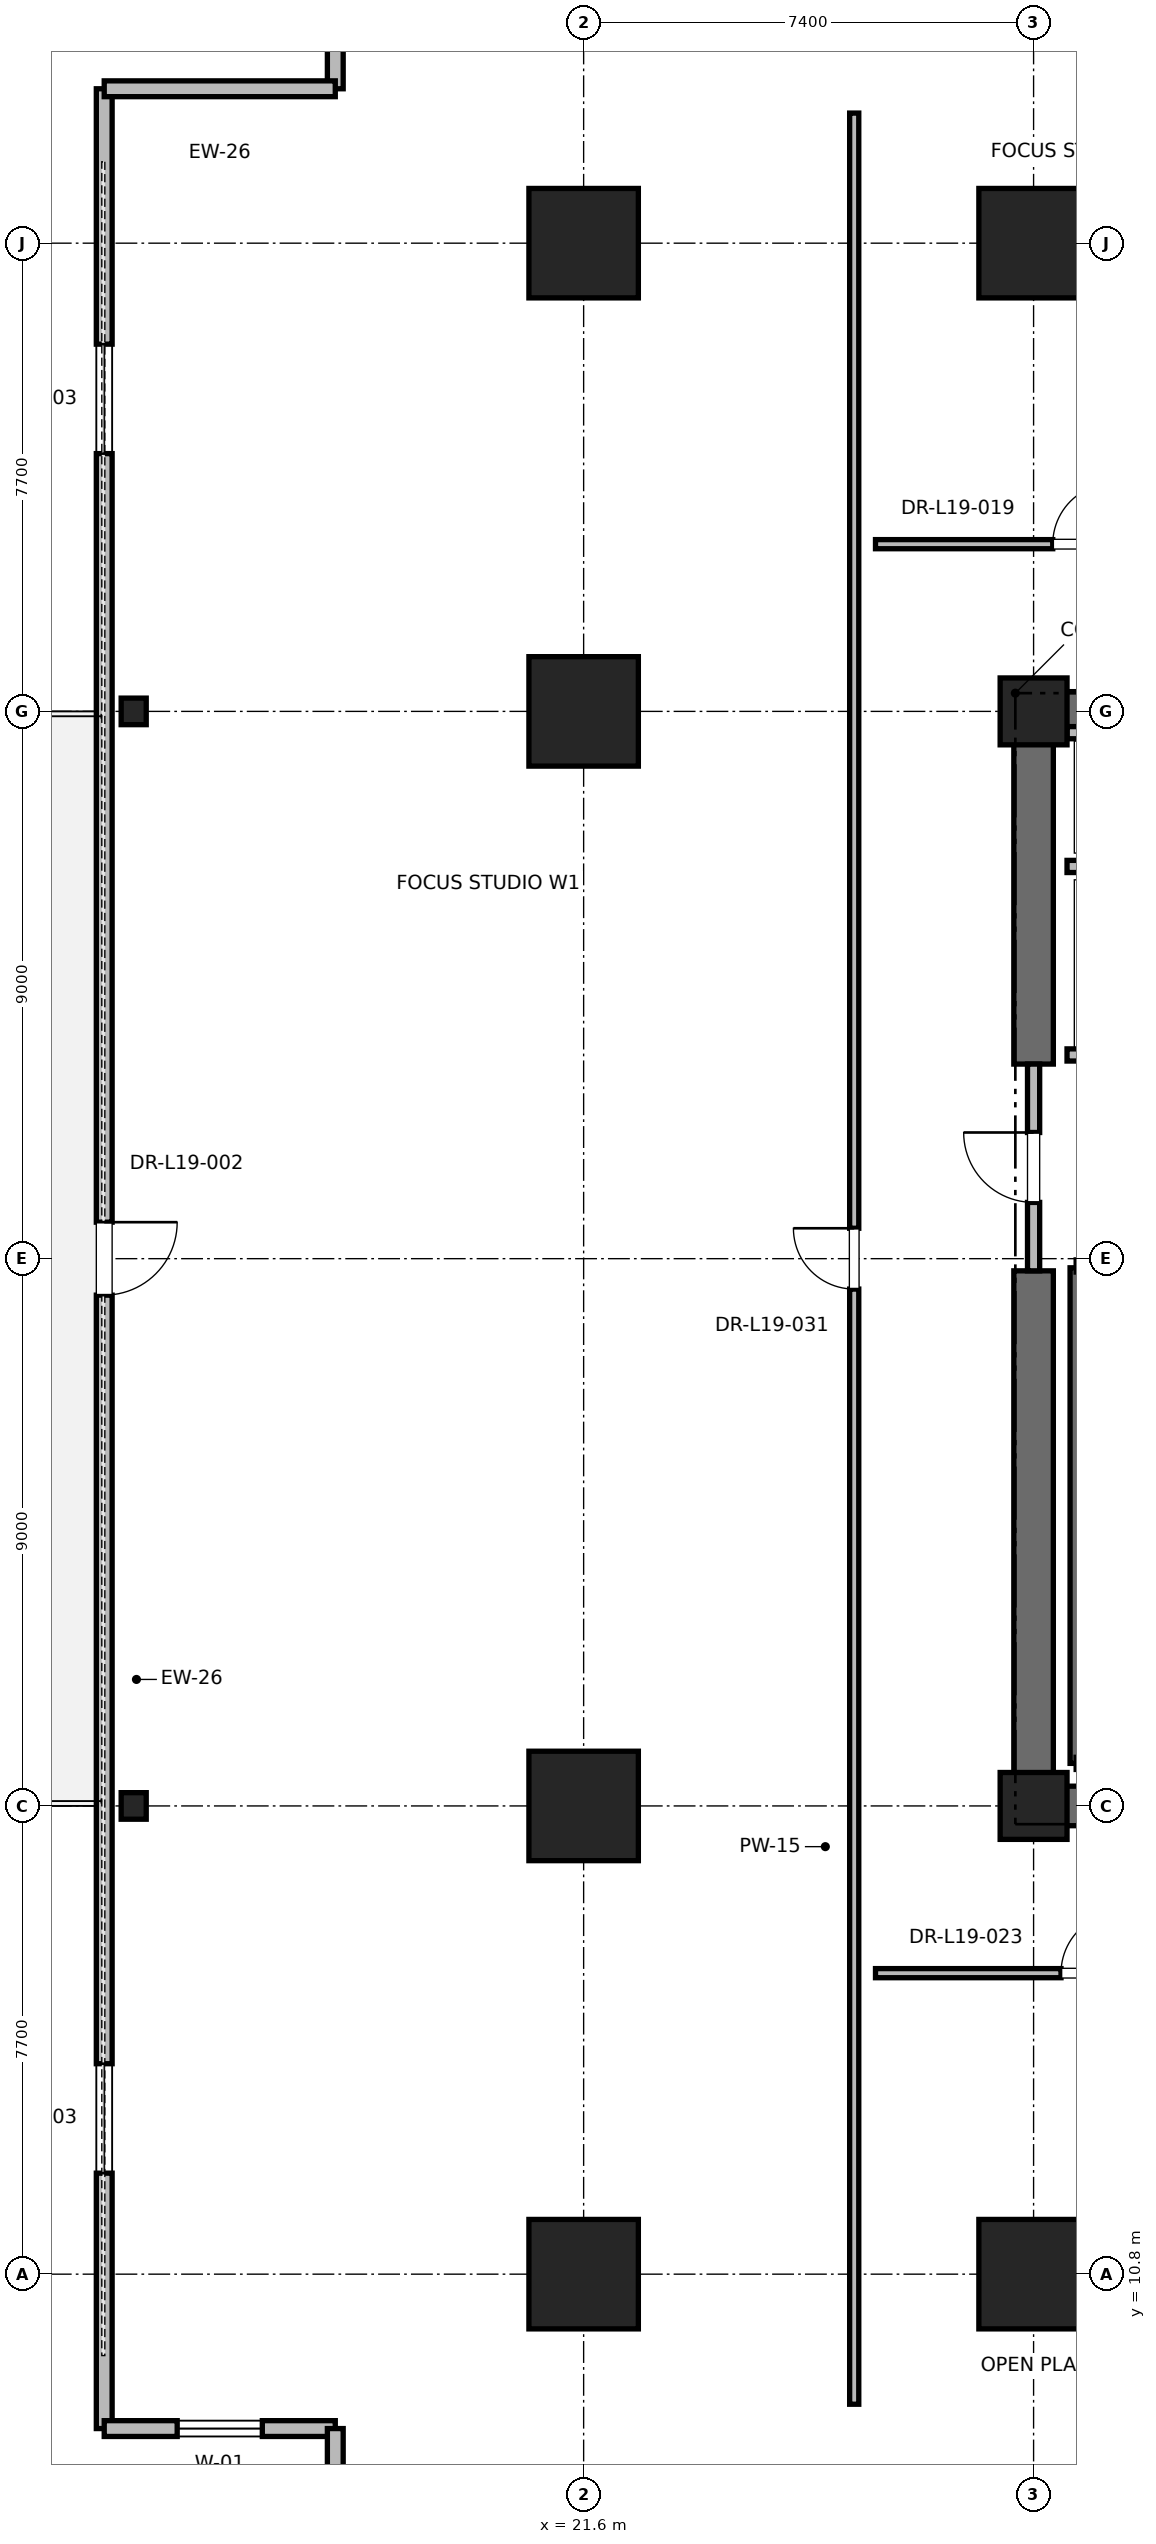
"""IFC4 building model, lengths in metres.
Left out: names, types, materials, properties, quantities, classifications, styles, units other than length and angle.
Written with IfcOpenShell. Run it as: python <this file> out.ifc"""

import sys

from ifc_helpers import new_model, si_unit, direction, frame, frame_2d, origin, origin_2d, place, context, subcontext, project, spatial, rectangle, i_section, extrude, element, fill, save


model = new_model("IFC4")
c1 = context("Model", 3, precision=1e-05, world=origin(), true_north=direction((0.0, 1.0)))
c2 = subcontext(c1, "Body", "Model", "MODEL_VIEW")
j1 = project(units=[si_unit("LENGTHUNIT", "METRE"), si_unit("PLANEANGLEUNIT", "RADIAN")], contexts=[c1])
p1 = place(None, origin())
s1 = spatial("IfcSite", under=j1, at=p1, CompositionType="ELEMENT")
p2 = place(p1, origin())
s2 = spatial("IfcBuilding", under=s1, at=p2, CompositionType="ELEMENT")
p3 = place(p2, frame((0.0, 0.0, 83.6)))
s3 = spatial("IfcBuildingStorey", under=s2, at=p3, CompositionType="ELEMENT", Elevation=83.6)
for number, where, z_axis, x_axis in (
    (1, (29.0, 10.8, 0.0), (0.0, 0.0, 1.0), (1.0, 0.0, 0.0)),
    (2, (29.0, 44.2, 0.0), (0.0, 0.0, 1.0), (1.0, 0.0, 0.0)),
    (3, (21.6, 18.5, 0.0), (0.0, 0.0, 1.0), (1.0, 0.0, 0.0)),
    (4, (21.6, 36.5, 0.0), (0.0, 0.0, 1.0), (1.0, 0.0, 0.0)),
    (5, (21.6, 10.8, 0.0), (0.0, 0.0, 1.0), (1.0, 0.0, 0.0)),
    (6, (21.6, 44.2, 0.0), (0.0, 0.0, 1.0), (1.0, 0.0, 0.0)),
):
    element("IfcColumn", number, at=place(p3, frame(where, z_axis=z_axis, x_axis=x_axis)), inside=s3, PredefinedType="COLUMN", context=c2, shape_type="SweptSolid", body=[
        extrude(rectangle(XDim=1.8, YDim=1.8, at=origin_2d()), origin(), (0.0, 0.0, 1.0), 4.0),
    ])
for number, where, z_axis, x_axis in (
    (7, (14.2, 18.5, 0.0), (0.0, 0.0, 1.0), (1.0, 0.0, 0.0)),
    (8, (14.2, 36.5, 0.0), (0.0, 0.0, 1.0), (1.0, 0.0, 0.0)),
):
    element("IfcColumn", number, at=place(p3, frame(where, z_axis=z_axis, x_axis=x_axis)), inside=s3, PredefinedType="COLUMN", context=c2, shape_type="SweptSolid", body=[
        extrude(i_section(OverallWidth=0.412, OverallDepth=0.437, WebThickness=0.036, FlangeThickness=0.058, FilletRadius=0.015, at=origin_2d()), origin(), (0.0, 0.0, 1.0), 4.0),
    ])
for number, where, z_axis, x_axis in (
    (9, (29.0, 18.5, 0.0), (0.0, 0.0, 1.0), (1.0, 0.0, 0.0)),
    (10, (29.0, 36.5, 0.0), (0.0, 0.0, 1.0), (1.0, 0.0, 0.0)),
):
    element("IfcColumn", number, at=place(p3, frame(where, z_axis=z_axis, x_axis=x_axis)), inside=s3, PredefinedType="PILASTER", context=c2, shape_type="SweptSolid", body=[
        extrude(rectangle(XDim=1.1, YDim=1.1, at=origin_2d()), origin(), (0.0, 0.0, 1.0), 4.0),
    ])
p4 = place(p3, frame((29.0, 18.5, 0.0), z_axis=(0.0, 0.0, 1.0), x_axis=(1.0, 0.0, 0.0)))
e11 = element("IfcWall", 11, at=p4, inside=s3, PredefinedType="SHEAR", context=c2, shape_type="SweptSolid", body=[
    extrude(rectangle(XDim=9.2, YDim=0.65, at=frame_2d((4.6, 0.0))), origin(), (0.0, 0.0, 1.0), 3.76),
])
p5 = place(p3, frame((29.0, 36.5, 0.0), z_axis=(0.0, 0.0, 1.0), x_axis=(1.0, 0.0, 0.0)))
e12 = element("IfcWall", 12, at=p5, inside=s3, PredefinedType="SHEAR", context=c2, shape_type="SweptSolid", body=[
    extrude(rectangle(XDim=5.8, YDim=0.65, at=frame_2d((2.9, 0.0))), origin(), (0.0, 0.0, 1.0), 3.76),
])
p6 = place(p3, frame((29.0, 18.5, 0.0), z_axis=(0.0, 0.0, 1.0), x_axis=(0.0, 1.0, 0.0)))
e13 = element("IfcWall", 13, at=p6, inside=s3, PredefinedType="SHEAR", context=c2, shape_type="SweptSolid", body=[
    extrude(rectangle(XDim=8.8, YDim=0.65, at=frame_2d((4.4, 0.0))), origin(), (0.0, 0.0, 1.0), 3.76),
])
p7 = place(p3, frame((29.0, 30.7, 0.0), z_axis=(0.0, 0.0, 1.0), x_axis=(0.0, 1.0, 0.0)))
e14 = element("IfcWall", 14, at=p7, inside=s3, PredefinedType="SHEAR", context=c2, shape_type="SweptSolid", body=[
    extrude(rectangle(XDim=5.8, YDim=0.65, at=frame_2d((2.9, 0.0))), origin(), (0.0, 0.0, 1.0), 3.76),
])
p8 = place(p3, frame((13.715, 46.739, 0.0), z_axis=(0.0, 0.0, 1.0), x_axis=(0.0, -1.0, 0.0)))
e15 = element("IfcWall", 15, at=p8, inside=s3, PredefinedType="PARAPET", context=c2, shape_type="SweptSolid", body=[
    extrude(rectangle(XDim=38.479, YDim=0.26, at=frame_2d((19.239, 0.0))), origin(), (0.0, 0.0, 1.0), 2.889),
])
p9 = place(p8, frame((4.2, 0.0, 0.85)))
e16 = element("IfcOpeningElement", 16, at=p9, cuts=e15, PredefinedType="OPENING", context=c2, shape_type="SweptSolid", body=[
    extrude(rectangle(XDim=1.8, YDim=2.2, at=frame_2d((0.9, 1.1))), frame((0.0, 0.13, 0.0), z_axis=(0.0, -1.0, 0.0), x_axis=(1.0, 0.0, 0.0)), (0.0, 0.0, 1.0), 0.26),
])
p10 = place(p8, frame((18.639, 0.0, 0.0)))
e17 = element("IfcOpeningElement", 17, at=p10, cuts=e15, PredefinedType="OPENING", context=c2, shape_type="SweptSolid", body=[
    extrude(rectangle(XDim=1.2, YDim=2.2, at=frame_2d((0.6, 1.1))), frame((0.0, 0.13, 0.0), z_axis=(0.0, -1.0, 0.0), x_axis=(1.0, 0.0, 0.0)), (0.0, 0.0, 1.0), 0.26),
])
p11 = place(p8, frame((32.479, 0.0, 0.85)))
e18 = element("IfcOpeningElement", 18, at=p11, cuts=e15, PredefinedType="OPENING", context=c2, shape_type="SweptSolid", body=[
    extrude(rectangle(XDim=1.8, YDim=2.2, at=frame_2d((0.9, 1.1))), frame((0.0, 0.13, 0.0), z_axis=(0.0, -1.0, 0.0), x_axis=(1.0, 0.0, 0.0)), (0.0, 0.0, 1.0), 0.26),
])
p12 = place(p3, frame((13.715, 8.261, 0.0), z_axis=(0.0, 0.0, 1.0), x_axis=(1.0, 0.0, 0.0)))
e19 = element("IfcWall", 19, at=p12, inside=s3, PredefinedType="PARAPET", context=c2, shape_type="SweptSolid", body=[
    extrude(rectangle(XDim=3.8, YDim=0.26, at=frame_2d((1.9, 0.0))), origin(), (0.0, 0.0, 1.0), 3.76),
])
p13 = place(p12, frame((1.2, 0.0, 0.85)))
e20 = element("IfcOpeningElement", 20, at=p13, cuts=e19, PredefinedType="OPENING", context=c2, shape_type="SweptSolid", body=[
    extrude(rectangle(XDim=1.4, YDim=2.0, at=frame_2d((0.7, 1.0))), frame((0.0, 0.13, 0.0), z_axis=(0.0, -1.0, 0.0), x_axis=(1.0, 0.0, 0.0)), (0.0, 0.0, 1.0), 0.26),
])
p14 = place(p3, frame((17.515, 8.261, 0.0), z_axis=(0.0, 0.0, 1.0), x_axis=(0.0, -1.0, 0.0)))
e21 = element("IfcWall", 21, at=p14, inside=s3, PredefinedType="PARAPET", context=c2, shape_type="SweptSolid", body=[
    extrude(rectangle(XDim=3.4, YDim=0.26, at=frame_2d((1.7, 0.0))), origin(), (0.0, 0.0, 1.0), 3.76),
])
p15 = place(p3, frame((17.515, 50.139, 0.0), z_axis=(0.0, 0.0, 1.0), x_axis=(0.0, -1.0, 0.0)))
e22 = element("IfcWall", 22, at=p15, inside=s3, PredefinedType="PARAPET", context=c2, shape_type="SweptSolid", body=[
    extrude(rectangle(XDim=3.4, YDim=0.26, at=frame_2d((1.7, 0.0))), origin(), (0.0, 0.0, 1.0), 3.76),
])
p16 = place(p15, frame((1.0, 0.0, 0.85)))
e23 = element("IfcOpeningElement", 23, at=p16, cuts=e22, PredefinedType="OPENING", context=c2, shape_type="SweptSolid", body=[
    extrude(rectangle(XDim=1.4, YDim=2.0, at=frame_2d((0.7, 1.0))), frame((0.0, 0.13, 0.0), z_axis=(0.0, -1.0, 0.0), x_axis=(1.0, 0.0, 0.0)), (0.0, 0.0, 1.0), 0.26),
])
p17 = place(p3, frame((17.515, 46.739, 0.0), z_axis=(0.0, 0.0, 1.0), x_axis=(-1.0, 0.0, 0.0)))
e24 = element("IfcWall", 24, at=p17, inside=s3, PredefinedType="PARAPET", context=c2, shape_type="SweptSolid", body=[
    extrude(rectangle(XDim=3.8, YDim=0.26, at=frame_2d((1.9, 0.0))), origin(), (0.0, 0.0, 1.0), 3.76),
])
p18 = place(p3, frame((29.7, 19.2, 0.0), z_axis=(0.0, 0.0, 1.0), x_axis=(0.0, 1.0, 0.0)))
e25 = element("IfcWall", 25, at=p18, inside=s3, PredefinedType="SOLIDWALL", context=c2, shape_type="SweptSolid", body=[
    extrude(rectangle(XDim=8.15, YDim=0.2, at=frame_2d((4.075, 0.0))), origin(), (0.0, 0.0, 1.0), 3.76),
])
p19 = place(p3, frame((29.0, 27.3, 0.0), z_axis=(0.0, 0.0, 1.0), x_axis=(0.0, 1.0, 0.0)))
e26 = element("IfcWall", 26, at=p19, inside=s3, PredefinedType="PARTITIONING", context=c2, shape_type="SweptSolid", body=[
    extrude(rectangle(XDim=3.4, YDim=0.2, at=frame_2d((1.7, 0.0))), origin(), (0.0, 0.0, 1.0), 2.54),
])
p20 = place(p19, frame((1.125, 0.0, 0.0)))
e27 = element("IfcOpeningElement", 27, at=p20, cuts=e26, PredefinedType="OPENING", context=c2, shape_type="SweptSolid", body=[
    extrude(rectangle(XDim=1.15, YDim=2.2, at=frame_2d((0.575, 1.1))), frame((0.0, 0.1, 0.0), z_axis=(0.0, -1.0, 0.0), x_axis=(1.0, 0.0, 0.0)), (0.0, 0.0, 1.0), 0.2),
])
p21 = place(p3, frame((29.55, 30.85, 0.0), z_axis=(0.0, 0.0, 1.0), x_axis=(1.0, 0.0, 0.0)))
e28 = element("IfcWall", 28, at=p21, inside=s3, PredefinedType="SOLIDWALL", context=c2, shape_type="SweptSolid", body=[
    extrude(rectangle(XDim=2.6, YDim=0.2, at=frame_2d((1.3, 0.0))), origin(), (0.0, 0.0, 1.0), 2.54),
])
p22 = place(p21, frame((0.75, 0.0, 0.0)))
e29 = element("IfcOpeningElement", 29, at=p22, cuts=e28, PredefinedType="OPENING", context=c2, shape_type="SweptSolid", body=[
    extrude(rectangle(XDim=1.1, YDim=2.2, at=frame_2d((0.55, 1.1))), frame((0.0, 0.1, 0.0), z_axis=(0.0, -1.0, 0.0), x_axis=(1.0, 0.0, 0.0)), (0.0, 0.0, 1.0), 0.2),
])
p23 = place(p3, frame((29.55, 33.95, 0.0), z_axis=(0.0, 0.0, 1.0), x_axis=(1.0, 0.0, 0.0)))
e30 = element("IfcWall", 30, at=p23, inside=s3, PredefinedType="SOLIDWALL", context=c2, shape_type="SweptSolid", body=[
    extrude(rectangle(XDim=2.8, YDim=0.2, at=frame_2d((1.4, 0.0))), origin(), (0.0, 0.0, 1.0), 3.76),
])
p24 = place(p3, frame((32.35, 36.15, 0.0), z_axis=(0.0, 0.0, 1.0), x_axis=(-1.0, 0.0, 0.0)))
e31 = element("IfcWall", 31, at=p24, inside=s3, PredefinedType="SOLIDWALL", context=c2, shape_type="SweptSolid", body=[
    extrude(rectangle(XDim=2.8, YDim=0.2, at=frame_2d((1.4, 0.0))), origin(), (0.0, 0.0, 1.0), 2.889),
])
p25 = place(p3, frame((26.4, 39.25, 0.0), z_axis=(0.0, 0.0, 1.0), x_axis=(1.0, 0.0, 0.0)))
e32 = element("IfcWall", 32, at=p25, inside=s3, PredefinedType="PARTITIONING", context=c2, shape_type="SweptSolid", body=[
    extrude(rectangle(XDim=6.8, YDim=0.15, at=frame_2d((3.4, 0.0))), origin(), (0.0, 0.0, 1.0), 2.85),
])
p26 = place(p25, frame((2.915, 0.0, 0.0)))
e33 = element("IfcOpeningElement", 33, at=p26, cuts=e32, PredefinedType="OPENING", context=c2, shape_type="SweptSolid", body=[
    extrude(rectangle(XDim=1.0, YDim=2.15, at=frame_2d((0.5, 1.075))), frame((0.0, 0.075, 0.0), z_axis=(0.0, -1.0, 0.0), x_axis=(1.0, 0.0, 0.0)), (0.0, 0.0, 1.0), 0.15),
])
p27 = place(p3, frame((26.4, 15.75, 0.0), z_axis=(0.0, 0.0, 1.0), x_axis=(1.0, 0.0, 0.0)))
e34 = element("IfcWall", 34, at=p27, inside=s3, PredefinedType="PARTITIONING", context=c2, shape_type="SweptSolid", body=[
    extrude(rectangle(XDim=7.072, YDim=0.15, at=frame_2d((3.536, 0.0))), origin(), (0.0, 0.0, 1.0), 2.85),
])
p28 = place(p27, frame((3.051, 0.0, 0.0)))
e35 = element("IfcOpeningElement", 35, at=p28, cuts=e34, PredefinedType="OPENING", context=c2, shape_type="SweptSolid", body=[
    extrude(rectangle(XDim=1.0, YDim=2.15, at=frame_2d((0.5, 1.075))), frame((0.0, 0.075, 0.0), z_axis=(0.0, -1.0, 0.0), x_axis=(1.0, 0.0, 0.0)), (0.0, 0.0, 1.0), 0.15),
])
p29 = place(p3, frame((26.05, 8.661, 0.0), z_axis=(0.0, 0.0, 1.0), x_axis=(0.0, 1.0, 0.0)))
e36 = element("IfcWall", 36, at=p29, inside=s3, PredefinedType="PARTITIONING", context=c2, shape_type="SweptSolid", body=[
    extrude(rectangle(XDim=37.678, YDim=0.15, at=frame_2d((18.839, 0.0))), origin(), (0.0, 0.0, 1.0), 2.85),
])
p30 = place(p29, frame((18.339, 0.0, 0.0)))
e37 = element("IfcOpeningElement", 37, at=p30, cuts=e36, PredefinedType="OPENING", context=c2, shape_type="SweptSolid", body=[
    extrude(rectangle(XDim=1.0, YDim=2.15, at=frame_2d((0.5, 1.075))), frame((0.0, 0.075, 0.0), z_axis=(0.0, -1.0, 0.0), x_axis=(1.0, 0.0, 0.0)), (0.0, 0.0, 1.0), 0.15),
])
p31 = place(p9, origin())
e38 = element("IfcWindow", 38, at=p31, inside=s3, PartitioningType="SINGLE_PANEL", PredefinedType="WINDOW", context=c2, shape_type="SweptSolid", body=[
    extrude(rectangle(XDim=1.8, YDim=2.2, at=frame_2d((0.9, 1.1))), frame((0.0, 0.03, 0.0), z_axis=(0.0, -1.0, 0.0), x_axis=(1.0, 0.0, 0.0)), (0.0, 0.0, 1.0), 0.06),
])
fill(e16, e38)
p32 = place(p10, origin())
e39 = element("IfcDoor", 39, at=p32, inside=s3, OperationType="SINGLE_SWING_LEFT", PredefinedType="DOOR", context=c2, shape_type="SweptSolid", body=[
    extrude(rectangle(XDim=1.2, YDim=2.2, at=frame_2d((0.6, 1.1))), frame((0.0, 0.025, 0.0), z_axis=(0.0, -1.0, 0.0), x_axis=(1.0, 0.0, 0.0)), (0.0, 0.0, 1.0), 0.05),
])
fill(e17, e39)
p33 = place(p11, origin())
e40 = element("IfcWindow", 40, at=p33, inside=s3, PartitioningType="SINGLE_PANEL", PredefinedType="WINDOW", context=c2, shape_type="SweptSolid", body=[
    extrude(rectangle(XDim=1.8, YDim=2.2, at=frame_2d((0.9, 1.1))), frame((0.0, 0.03, 0.0), z_axis=(0.0, -1.0, 0.0), x_axis=(1.0, 0.0, 0.0)), (0.0, 0.0, 1.0), 0.06),
])
fill(e18, e40)
p34 = place(p13, origin())
e41 = element("IfcWindow", 41, at=p34, inside=s3, PartitioningType="SINGLE_PANEL", PredefinedType="WINDOW", context=c2, shape_type="SweptSolid", body=[
    extrude(rectangle(XDim=1.4, YDim=2.0, at=frame_2d((0.7, 1.0))), frame((0.0, 0.03, 0.0), z_axis=(0.0, -1.0, 0.0), x_axis=(1.0, 0.0, 0.0)), (0.0, 0.0, 1.0), 0.06),
])
fill(e20, e41)
p35 = place(p20, origin())
e42 = element("IfcDoor", 42, at=p35, inside=s3, OperationType="SINGLE_SWING_RIGHT", PredefinedType="DOOR", context=c2, shape_type="SweptSolid", body=[
    extrude(rectangle(XDim=1.15, YDim=2.2, at=frame_2d((0.575, 1.1))), frame((0.0, 0.025, 0.0), z_axis=(0.0, -1.0, 0.0), x_axis=(1.0, 0.0, 0.0)), (0.0, 0.0, 1.0), 0.05),
])
fill(e27, e42)
p36 = place(p26, origin())
e43 = element("IfcDoor", 43, at=p36, inside=s3, OperationType="SINGLE_SWING_RIGHT", PredefinedType="DOOR", context=c2, shape_type="SweptSolid", body=[
    extrude(rectangle(XDim=1.0, YDim=2.15, at=frame_2d((0.5, 1.075))), frame((0.0, 0.025, 0.0), z_axis=(0.0, -1.0, 0.0), x_axis=(1.0, 0.0, 0.0)), (0.0, 0.0, 1.0), 0.05),
])
fill(e33, e43)
p37 = place(p28, origin())
e44 = element("IfcDoor", 44, at=p37, inside=s3, OperationType="SINGLE_SWING_RIGHT", PredefinedType="DOOR", context=c2, shape_type="SweptSolid", body=[
    extrude(rectangle(XDim=1.0, YDim=2.15, at=frame_2d((0.5, 1.075))), frame((0.0, 0.025, 0.0), z_axis=(0.0, -1.0, 0.0), x_axis=(1.0, 0.0, 0.0)), (0.0, 0.0, 1.0), 0.05),
])
fill(e35, e44)
p38 = place(p30, origin())
e45 = element("IfcDoor", 45, at=p38, inside=s3, OperationType="SINGLE_SWING_RIGHT", PredefinedType="DOOR", context=c2, shape_type="SweptSolid", body=[
    extrude(rectangle(XDim=1.0, YDim=2.15, at=frame_2d((0.5, 1.075))), frame((0.0, 0.025, 0.0), z_axis=(0.0, -1.0, 0.0), x_axis=(1.0, 0.0, 0.0)), (0.0, 0.0, 1.0), 0.05),
])
fill(e37, e45)
save(model, sys.argv[1])
